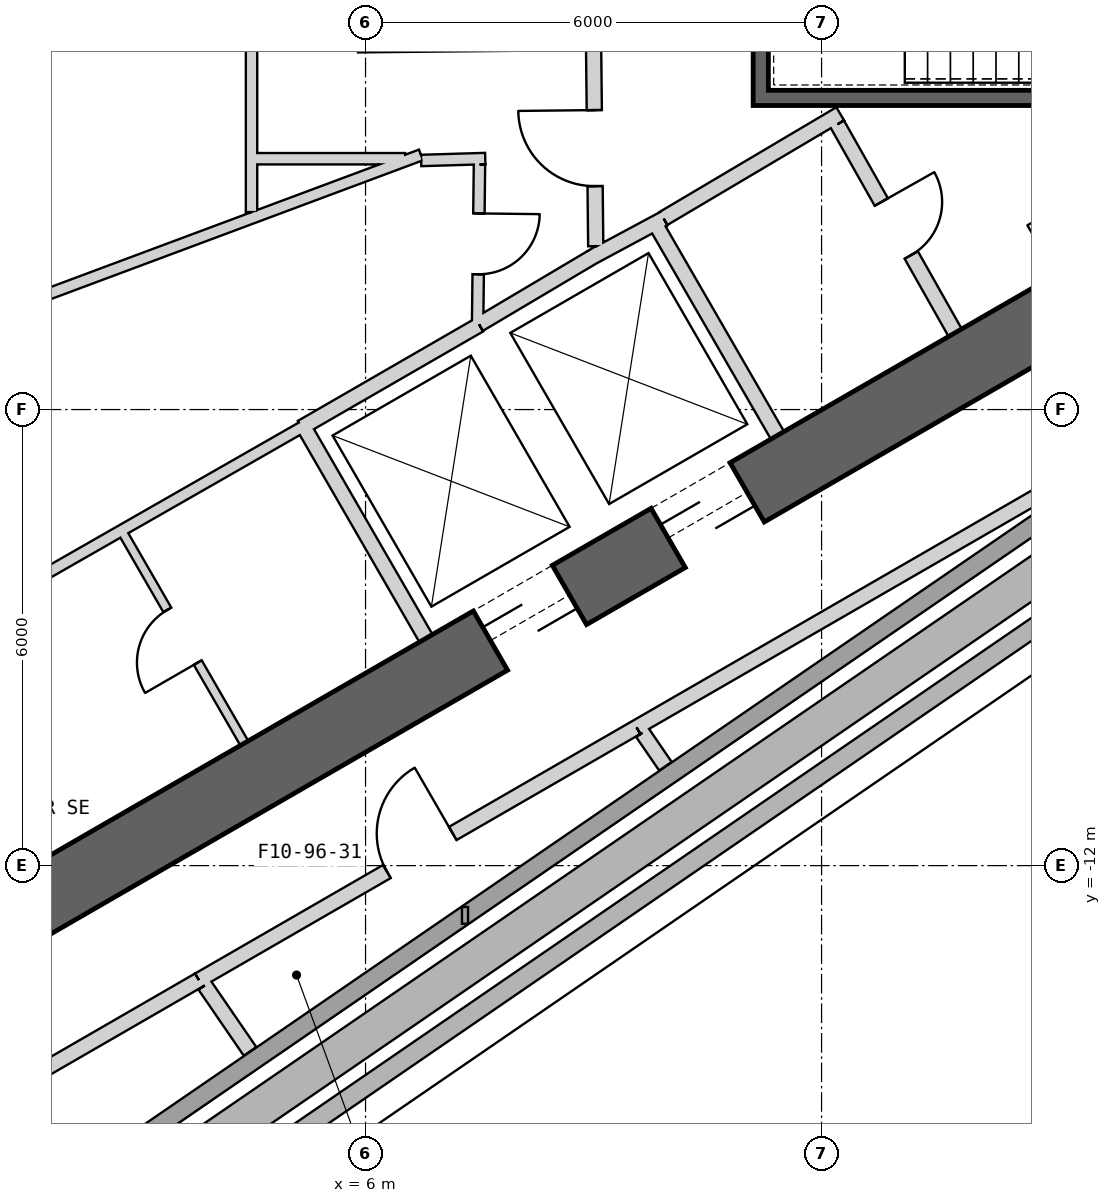
"""IFC4 building model, lengths in metres.
Left out: names, types, materials, properties, quantities, classifications, styles, units other than length and angle.
Written with IfcOpenShell. Run it as: python <this file> out.ifc"""

import sys

from ifc_helpers import new_model, si_unit, direction, frame, frame_2d, origin, place, context, subcontext, project, spatial, rectangle, extrude, element, fill, save


model = new_model("IFC4")
c1 = context("Model", 3, precision=1e-05, world=origin(), true_north=direction((0.0, 1.0)))
c2 = subcontext(c1, "Body", "Model", "MODEL_VIEW")
j1 = project(units=[si_unit("LENGTHUNIT", "METRE"), si_unit("PLANEANGLEUNIT", "RADIAN")], contexts=[c1])
p1 = place(None, origin())
s1 = spatial("IfcSite", under=j1, at=p1, CompositionType="ELEMENT")
p2 = place(p1, origin())
s2 = spatial("IfcBuilding", under=s1, at=p2, CompositionType="ELEMENT")
p3 = place(p2, frame((0.0, 0.0, 425.3)))
s3 = spatial("IfcBuildingStorey", under=s2, at=p3, CompositionType="ELEMENT", Elevation=425.3)
p4 = place(p3, frame((-7.825, -17.97, 0.0), z_axis=(0.0, 0.0, 1.0), x_axis=(0.866028369851, 0.499994862586, 0.0)))
e1 = element("IfcWall", 1, at=p4, inside=s3, PredefinedType="SHEAR", context=c2, shape_type="SweptSolid", body=[
    extrude(rectangle(XDim=31.523, YDim=0.9, at=frame_2d((15.762, 0.0))), origin(), (0.0, 0.0, 1.0), 5.0),
])
p5 = place(p4, frame((17.862, 0.0, 0.0)))
e2 = element("IfcOpeningElement", 2, at=p5, cuts=e1, PredefinedType="OPENING", context=c2, shape_type="SweptSolid", body=[
    extrude(rectangle(XDim=1.2, YDim=2.4, at=frame_2d((0.6, 1.2))), frame((0.0, 0.46, 0.0), z_axis=(0.0, -1.0, 0.0), x_axis=(1.0, 0.0, 0.0)), (0.0, 0.0, 1.0), 0.92),
])
p6 = place(p4, frame((20.562, 0.0, 0.0)))
e3 = element("IfcOpeningElement", 3, at=p6, cuts=e1, PredefinedType="OPENING", context=c2, shape_type="SweptSolid", body=[
    extrude(rectangle(XDim=1.2, YDim=2.4, at=frame_2d((0.6, 1.2))), frame((0.0, 0.46, 0.0), z_axis=(0.0, -1.0, 0.0), x_axis=(1.0, 0.0, 0.0)), (0.0, 0.0, 1.0), 0.92),
])
p7 = place(p4, frame((26.712, 0.0, 0.0)))
e4 = element("IfcOpeningElement", 4, at=p7, cuts=e1, PredefinedType="OPENING", context=c2, shape_type="SweptSolid", body=[
    extrude(rectangle(XDim=1.2, YDim=2.4, at=frame_2d((0.6, 1.2))), frame((0.0, 0.46, 0.0), z_axis=(0.0, -1.0, 0.0), x_axis=(1.0, 0.0, 0.0)), (0.0, 0.0, 1.0), 0.92),
])
p8 = place(p4, frame((3.612, 0.0, 0.0)))
e5 = element("IfcOpeningElement", 5, at=p8, cuts=e1, PredefinedType="OPENING", context=c2, shape_type="SweptSolid", body=[
    extrude(rectangle(XDim=1.2, YDim=2.4, at=frame_2d((0.6, 1.2))), frame((0.0, 0.46, 0.0), z_axis=(0.0, -1.0, 0.0), x_axis=(1.0, 0.0, 0.0)), (0.0, 0.0, 1.0), 0.92),
])
p9 = place(p3, frame((-0.922, -18.304, 0.0), z_axis=(0.0, 0.0, 1.0), x_axis=(0.824481583442, 0.565888786393, 0.0)))
e6 = element("IfcWall", 6, at=p9, inside=s3, PredefinedType="SOLIDWALL", context=c2, shape_type="SweptSolid", body=[
    extrude(rectangle(XDim=19.966, YDim=0.24, at=frame_2d((9.983, 0.0))), origin(), (0.0, 0.0, 1.0), 4.75),
])
p10 = place(p3, frame((16.933, -7.402, 0.04), z_axis=(0.0, 0.0, 1.0), x_axis=(-0.824479303652, -0.565892107958, 0.0)))
e7 = element("IfcWall", 7, at=p10, inside=s3, PredefinedType="PARAPET", context=c2, shape_type="SweptSolid", body=[
    extrude(rectangle(XDim=21.975, YDim=0.25, at=frame_2d((10.987, 0.0))), origin(), (0.0, 0.0, 1.0), 1.2),
])
p11 = place(p3, frame((16.181, -7.25, 0.04), z_axis=(0.0, 0.0, 1.0), x_axis=(-0.824481781464, -0.56588849788, 0.0)))
e8 = element("IfcWall", 8, at=p11, inside=s3, PredefinedType="PARAPET", context=c2, shape_type="SweptSolid", body=[
    extrude(rectangle(XDim=20.799, YDim=0.5, at=frame_2d((10.399, 0.0))), origin(), (0.0, 0.0, 1.0), 0.6),
])
p12 = place(p3, frame((6.795, -9.01, 0.0), z_axis=(0.0, 0.0, 1.0), x_axis=(-0.499984717929, 0.866034226713, 0.0)))
e9 = element("IfcWall", 9, at=p12, inside=s3, PredefinedType="PLUMBINGWALL", context=c2, shape_type="SweptSolid", body=[
    extrude(rectangle(XDim=3.25, YDim=0.2, at=frame_2d((1.625, 0.0))), origin(), (0.0, 0.0, 1.0), 4.75),
])
p13 = place(p3, frame((5.159, -6.236, 0.0), z_axis=(0.0, 0.0, 1.0), x_axis=(0.866036505625, 0.499980770555, 0.0)))
e10 = element("IfcWall", 10, at=p13, inside=s3, PredefinedType="PLUMBINGWALL", context=c2, shape_type="SweptSolid", body=[
    extrude(rectangle(XDim=2.7, YDim=0.2, at=frame_2d((1.35, 0.0))), origin(), (0.0, 0.0, 1.0), 4.75),
])
p14 = place(p3, frame((9.795, -3.525, 0.0), z_axis=(0.0, 0.0, 1.0), x_axis=(0.499984717929, -0.866034226713, 0.0)))
e11 = element("IfcWall", 11, at=p14, inside=s3, PredefinedType="PLUMBINGWALL", context=c2, shape_type="SweptSolid", body=[
    extrude(rectangle(XDim=3.25, YDim=0.2, at=frame_2d((1.625, 0.0))), origin(), (0.0, 0.0, 1.0), 4.75),
])
p15 = place(p3, frame((8.974, -3.999, 0.0), z_axis=(0.0, 0.0, 1.0), x_axis=(0.880907015104, 0.473289373154, 0.0)))
e12 = element("IfcWall", 12, at=p15, inside=s3, PredefinedType="PLUMBINGWALL", context=c2, shape_type="SweptSolid", body=[
    extrude(rectangle(XDim=1.078, YDim=0.2, at=frame_2d((0.539, 0.0))), origin(), (0.0, 0.0, 1.0), 4.75),
])
p16 = place(p3, frame((7.493, -4.878, 0.0), z_axis=(0.0, 0.0, 1.0), x_axis=(0.859981807212, 0.510324691999, 0.0)))
e13 = element("IfcWall", 13, at=p16, inside=s3, PredefinedType="PLUMBINGWALL", context=c2, shape_type="SweptSolid", body=[
    extrude(rectangle(XDim=1.845, YDim=0.2, at=frame_2d((0.922, 0.0))), origin(), (0.0, 0.0, 1.0), 4.75),
])
p17 = place(p3, frame((11.1, -1.9, -0.25), z_axis=(0.0, 0.0, 1.0), x_axis=(1.0, 0.0, 0.0)))
e14 = element("IfcWall", 14, at=p17, inside=s3, PredefinedType="SHEAR", context=c2, shape_type="SweptSolid", body=[
    extrude(rectangle(XDim=7.9, YDim=0.2, at=frame_2d((3.95, 0.0))), origin(), (0.0, 0.0, 1.0), 5.0),
])
p18 = place(p3, frame((11.2, -1.8, -0.25), z_axis=(0.0, 0.0, 1.0), x_axis=(0.0, 1.0, 0.0)))
e15 = element("IfcWall", 15, at=p18, inside=s3, PredefinedType="SHEAR", context=c2, shape_type="SweptSolid", body=[
    extrude(rectangle(XDim=3.6, YDim=0.2, at=frame_2d((1.8, 0.0))), origin(), (0.0, 0.0, 1.0), 5.0),
])
p19 = place(p18, frame((1.25, 0.0, 0.25)))
e16 = element("IfcOpeningElement", 16, at=p19, cuts=e15, PredefinedType="OPENING", context=c2, shape_type="SweptSolid", body=[
    extrude(rectangle(XDim=1.1, YDim=2.1, at=frame_2d((0.55, 1.05))), frame((0.0, 0.11, 0.0), z_axis=(0.0, -1.0, 0.0), x_axis=(1.0, 0.0, 0.0)), (0.0, 0.0, 1.0), 0.22),
])
p20 = place(p3, frame((5.9, -1.201, 0.0), z_axis=(0.0, 0.0, 1.0), x_axis=(0.999950064753, 0.009993397809, 0.0)))
e17 = element("IfcWall", 17, at=p20, inside=s3, PredefinedType="PLUMBINGWALL", context=c2, shape_type="SweptSolid", body=[
    extrude(rectangle(XDim=3.2, YDim=0.2, at=frame_2d((1.6, 0.0))), origin(), (0.0, 0.0, 1.0), 4.75),
])
p21 = place(p3, frame((4.405, -10.389, 0.0), z_axis=(0.0, 0.0, 1.0), x_axis=(-0.500017246033, 0.866015446554, 0.0)))
e18 = element("IfcWall", 18, at=p21, inside=s3, PredefinedType="PARTITIONING", context=c2, shape_type="SweptSolid", body=[
    extrude(rectangle(XDim=3.25, YDim=0.12, at=frame_2d((1.625, 0.0))), origin(), (0.0, 0.0, 1.0), 4.75),
])
p22 = place(p21, frame((1.225, 0.0, 0.0)))
e19 = element("IfcOpeningElement", 19, at=p22, cuts=e18, PredefinedType="OPENING", context=c2, shape_type="SweptSolid", body=[
    extrude(rectangle(XDim=0.8, YDim=2.1, at=frame_2d((0.4, 1.05))), frame((0.0, 0.07, 0.0), z_axis=(0.0, -1.0, 0.0), x_axis=(1.0, 0.0, 0.0)), (0.0, 0.0, 1.0), 0.14),
])
p23 = place(p3, frame((-1.024, -9.771, 0.0), z_axis=(0.0, 0.0, 1.0), x_axis=(0.868110220015, 0.496371479746, 0.0)))
e20 = element("IfcWall", 20, at=p23, inside=s3, PredefinedType="PLUMBINGWALL", context=c2, shape_type="SweptSolid", body=[
    extrude(rectangle(XDim=7.123, YDim=0.15, at=frame_2d((3.561, 0.0))), origin(), (0.0, 0.0, 1.0), 4.75),
])
p24 = place(p3, frame((12.245, -2.109, 0.0), z_axis=(0.0, 0.0, 1.0), x_axis=(-0.860414880418, -0.509594185166, 0.0)))
e21 = element("IfcWall", 21, at=p24, inside=s3, PredefinedType="PARTITIONING", context=c2, shape_type="SweptSolid", body=[
    extrude(rectangle(XDim=2.7, YDim=0.2, at=frame_2d((1.35, 0.0))), origin(), (0.0, 0.0, 1.0), 4.75),
])
p25 = place(p3, frame((13.758, -4.99, 0.0), z_axis=(0.0, 0.0, 1.0), x_axis=(-0.491993409184, 0.87059892334, 0.0)))
e22 = element("IfcWall", 22, at=p25, inside=s3, PredefinedType="PARTITIONING", context=c2, shape_type="SweptSolid", body=[
    extrude(rectangle(XDim=3.15, YDim=0.2, at=frame_2d((1.575, 0.0))), origin(), (0.0, 0.0, 1.0), 4.75),
])
p26 = place(p25, frame((1.175, 0.0, 0.0)))
e23 = element("IfcOpeningElement", 23, at=p26, cuts=e22, PredefinedType="OPENING", context=c2, shape_type="SweptSolid", body=[
    extrude(rectangle(XDim=0.8, YDim=2.1, at=frame_2d((0.4, 1.05))), frame((0.0, 0.11, 0.0), z_axis=(0.0, -1.0, 0.0), x_axis=(1.0, 0.0, 0.0)), (0.0, 0.0, 1.0), 0.22),
])
p27 = place(p3, frame((9.029, -3.851, 0.0), z_axis=(0.0, 0.0, 1.0), x_axis=(-0.010783593937, 0.99994185536, 0.0)))
e24 = element("IfcWall", 24, at=p27, inside=s3, PredefinedType="PARTITIONING", context=c2, shape_type="SweptSolid", body=[
    extrude(rectangle(XDim=2.581, YDim=0.2, at=frame_2d((1.291, 0.0))), origin(), (0.0, 0.0, 1.0), 4.75),
])
p28 = place(p27, frame((0.791, 0.0, 0.0)))
e25 = element("IfcOpeningElement", 25, at=p28, cuts=e24, PredefinedType="OPENING", context=c2, shape_type="SweptSolid", body=[
    extrude(rectangle(XDim=1.0, YDim=2.1, at=frame_2d((0.5, 1.05))), frame((0.0, 0.11, 0.0), z_axis=(0.0, -1.0, 0.0), x_axis=(1.0, 0.0, 0.0)), (0.0, 0.0, 1.0), 0.22),
])
p29 = place(p3, frame((6.729, -2.65, 0.0), z_axis=(0.0, 0.0, 1.0), x_axis=(-0.936914282609, -0.349559189613, 0.0)))
e26 = element("IfcWall", 26, at=p29, inside=s3, PredefinedType="PLUMBINGWALL", context=c2, shape_type="SweptSolid", body=[
    extrude(rectangle(XDim=9.291, YDim=0.15, at=frame_2d((4.645, 0.0))), origin(), (0.0, 0.0, 1.0), 4.75),
])
p30 = place(p3, frame((4.5, -3.402, 0.0), z_axis=(0.0, 0.0, 1.0), x_axis=(0.0, 1.0, 0.0)))
e27 = element("IfcWall", 27, at=p30, inside=s3, PredefinedType="PLUMBINGWALL", context=c2, shape_type="SweptSolid", body=[
    extrude(rectangle(XDim=2.402, YDim=0.15, at=frame_2d((1.201, 0.0))), origin(), (0.0, 0.0, 1.0), 4.75),
])
p31 = place(p3, frame((6.521, -2.7, 0.0), z_axis=(0.0, 0.0, 1.0), x_axis=(-1.0, 0.0, 0.0)))
e28 = element("IfcWall", 28, at=p31, inside=s3, PredefinedType="PLUMBINGWALL", context=c2, shape_type="SweptSolid", body=[
    extrude(rectangle(XDim=1.946, YDim=0.15, at=frame_2d((0.973, 0.0))), origin(), (0.0, 0.0, 1.0), 4.75),
])
p32 = place(p3, frame((7.575, -2.698, 0.0), z_axis=(0.0, 0.0, 1.0), x_axis=(-0.999547263436, -0.0300876745, 0.0)))
e29 = element("IfcWall", 29, at=p32, inside=s3, PredefinedType="PLUMBINGWALL", context=c2, shape_type="SweptSolid", body=[
    extrude(rectangle(XDim=0.844, YDim=0.15, at=frame_2d((0.422, 0.0))), origin(), (0.0, 0.0, 1.0), 4.75),
])
p33 = place(p3, frame((7.475, -4.865, 0.0), z_axis=(0.0, 0.0, 1.0), x_axis=(0.011682810534, 0.99993175364, 0.0)))
e30 = element("IfcWall", 30, at=p33, inside=s3, PredefinedType="PLUMBINGWALL", context=c2, shape_type="SweptSolid", body=[
    extrude(rectangle(XDim=2.09, YDim=0.15, at=frame_2d((1.045, 0.0))), origin(), (0.0, 0.0, 1.0), 4.75),
])
p34 = place(p33, frame((0.645, 0.0, 0.0)))
e31 = element("IfcOpeningElement", 31, at=p34, cuts=e30, PredefinedType="OPENING", context=c2, shape_type="SweptSolid", body=[
    extrude(rectangle(XDim=0.8, YDim=2.1, at=frame_2d((0.4, 1.05))), frame((0.0, 0.085, 0.0), z_axis=(0.0, -1.0, 0.0), x_axis=(1.0, 0.0, 0.0)), (0.0, 0.0, 1.0), 0.17),
])
p35 = place(p3, frame((-7.234, -19.881, 0.0), z_axis=(0.0, 0.0, 1.0), x_axis=(0.866028703517, 0.499994284652, 0.0)))
e32 = element("IfcWall", 32, at=p35, inside=s3, PredefinedType="PARTITIONING", context=c2, shape_type="SweptSolid", body=[
    extrude(rectangle(XDim=12.75, YDim=0.2, at=frame_2d((6.375, 0.0))), origin(), (0.0, 0.0, 1.0), 4.75),
])
p36 = place(p35, frame((5.9, 0.0, 0.0)))
e33 = element("IfcOpeningElement", 33, at=p36, cuts=e32, PredefinedType="OPENING", context=c2, shape_type="SweptSolid", body=[
    extrude(rectangle(XDim=1.0, YDim=2.1, at=frame_2d((0.5, 1.05))), frame((0.0, 0.11, 0.0), z_axis=(0.0, -1.0, 0.0), x_axis=(1.0, 0.0, 0.0)), (0.0, 0.0, 1.0), 0.22),
])
p37 = place(p3, frame((3.808, -13.506, 0.0), z_axis=(0.0, 0.0, 1.0), x_axis=(0.866031500321, 0.49998944034, 0.0)))
e34 = element("IfcWall", 34, at=p37, inside=s3, PredefinedType="PARTITIONING", context=c2, shape_type="SweptSolid", body=[
    extrude(rectangle(XDim=6.649, YDim=0.2, at=frame_2d((3.325, 0.0))), origin(), (0.0, 0.0, 1.0), 4.75),
])
p38 = place(p37, frame((2.856, 0.0, 0.0)))
e35 = element("IfcOpeningElement", 35, at=p38, cuts=e34, PredefinedType="OPENING", context=c2, shape_type="SweptSolid", body=[
    extrude(rectangle(XDim=1.0, YDim=2.1, at=frame_2d((0.5, 1.05))), frame((0.0, 0.11, 0.0), z_axis=(0.0, -1.0, 0.0), x_axis=(1.0, 0.0, 0.0)), (0.0, 0.0, 1.0), 0.22),
])
p39 = place(p3, frame((9.566, -10.181, 0.0), z_axis=(0.0, 0.0, 1.0), x_axis=(0.866019300368, 0.500010571279, 0.0)))
e36 = element("IfcWall", 36, at=p39, inside=s3, PredefinedType="PARTITIONING", context=c2, shape_type="SweptSolid", body=[
    extrude(rectangle(XDim=12.812, YDim=0.2, at=frame_2d((6.406, 0.0))), origin(), (0.0, 0.0, 1.0), 4.75),
])
p40 = place(p39, frame((11.612, 0.0, 0.0)))
e37 = element("IfcOpeningElement", 37, at=p40, cuts=e36, PredefinedType="OPENING", context=c2, shape_type="SweptSolid", body=[
    extrude(rectangle(XDim=1.0, YDim=2.1, at=frame_2d((0.5, 1.05))), frame((0.0, 0.11, 0.0), z_axis=(0.0, -1.0, 0.0), x_axis=(1.0, 0.0, 0.0)), (0.0, 0.0, 1.0), 0.22),
])
p41 = place(p3, frame((4.481, -14.444, 0.0), z_axis=(0.0, 0.0, 1.0), x_axis=(-0.565839404431, 0.824515474927, 0.0)))
e38 = element("IfcWall", 38, at=p41, inside=s3, PredefinedType="PARTITIONING", context=c2, shape_type="SweptSolid", body=[
    extrude(rectangle(XDim=1.052, YDim=0.2, at=frame_2d((0.526, 0.0))), origin(), (0.0, 0.0, 1.0), 4.75),
])
p42 = place(p3, frame((9.643, -10.252, 0.0), z_axis=(0.0, 0.0, 1.0), x_axis=(0.565501745664, -0.824747097995, 0.0)))
e39 = element("IfcWall", 39, at=p42, inside=s3, PredefinedType="PARTITIONING", context=c2, shape_type="SweptSolid", body=[
    extrude(rectangle(XDim=0.535, YDim=0.2, at=frame_2d((0.268, 0.0))), origin(), (0.0, 0.0, 1.0), 4.75),
])
p43 = place(p28, origin())
e40 = element("IfcDoor", 40, at=p43, inside=s3, OperationType="SINGLE_SWING_RIGHT", PredefinedType="USERDEFINED", context=c2, shape_type="SweptSolid", body=[
    extrude(rectangle(XDim=1.0, YDim=2.1, at=frame_2d((0.5, 1.05))), frame((0.0, 0.025, 0.0), z_axis=(0.0, -1.0, 0.0), x_axis=(1.0, 0.0, 0.0)), (0.0, 0.0, 1.0), 0.05),
])
fill(e25, e40)
p44 = place(p34, origin())
e41 = element("IfcDoor", 41, at=p44, inside=s3, OperationType="SINGLE_SWING_RIGHT", PredefinedType="USERDEFINED", context=c2, shape_type="SweptSolid", body=[
    extrude(rectangle(XDim=0.8, YDim=2.1, at=frame_2d((0.4, 1.05))), frame((0.0, 0.025, 0.0), z_axis=(0.0, -1.0, 0.0), x_axis=(1.0, 0.0, 0.0)), (0.0, 0.0, 1.0), 0.05),
])
fill(e31, e41)
p45 = place(p22, origin())
e42 = element("IfcDoor", 42, at=p45, inside=s3, OperationType="SINGLE_SWING_LEFT", PredefinedType="USERDEFINED", context=c2, shape_type="SweptSolid", body=[
    extrude(rectangle(XDim=0.8, YDim=2.1, at=frame_2d((0.4, 1.05))), frame((0.0, 0.025, 0.0), z_axis=(0.0, -1.0, 0.0), x_axis=(1.0, 0.0, 0.0)), (0.0, 0.0, 1.0), 0.05),
])
fill(e19, e42)
p46 = place(p26, origin())
e43 = element("IfcDoor", 43, at=p46, inside=s3, OperationType="SINGLE_SWING_RIGHT", PredefinedType="USERDEFINED", context=c2, shape_type="SweptSolid", body=[
    extrude(rectangle(XDim=0.8, YDim=2.1, at=frame_2d((0.4, 1.05))), frame((0.0, 0.025, 0.0), z_axis=(0.0, -1.0, 0.0), x_axis=(1.0, 0.0, 0.0)), (0.0, 0.0, 1.0), 0.05),
])
fill(e23, e43)
p47 = place(p38, origin())
e44 = element("IfcDoor", 44, at=p47, inside=s3, OperationType="SINGLE_SWING_RIGHT", PredefinedType="USERDEFINED", context=c2, shape_type="SweptSolid", body=[
    extrude(rectangle(XDim=1.0, YDim=2.1, at=frame_2d((0.5, 1.05))), frame((0.0, 0.025, 0.0), z_axis=(0.0, -1.0, 0.0), x_axis=(1.0, 0.0, 0.0)), (0.0, 0.0, 1.0), 0.05),
])
fill(e35, e44)
p48 = place(p5, origin())
e45 = element("IfcDoor", 45, at=p48, inside=s3, OperationType="SLIDING_TO_LEFT", PredefinedType="USERDEFINED", context=c2, shape_type="SweptSolid", body=[
    extrude(rectangle(XDim=1.2, YDim=2.4, at=frame_2d((0.6, 1.2))), frame((0.0, 0.025, 0.0), z_axis=(0.0, -1.0, 0.0), x_axis=(1.0, 0.0, 0.0)), (0.0, 0.0, 1.0), 0.05),
])
fill(e2, e45)
p49 = place(p6, origin())
e46 = element("IfcDoor", 46, at=p49, inside=s3, OperationType="SLIDING_TO_LEFT", PredefinedType="USERDEFINED", context=c2, shape_type="SweptSolid", body=[
    extrude(rectangle(XDim=1.2, YDim=2.4, at=frame_2d((0.6, 1.2))), frame((0.0, 0.025, 0.0), z_axis=(0.0, -1.0, 0.0), x_axis=(1.0, 0.0, 0.0)), (0.0, 0.0, 1.0), 0.05),
])
fill(e3, e46)
save(model, sys.argv[1])
